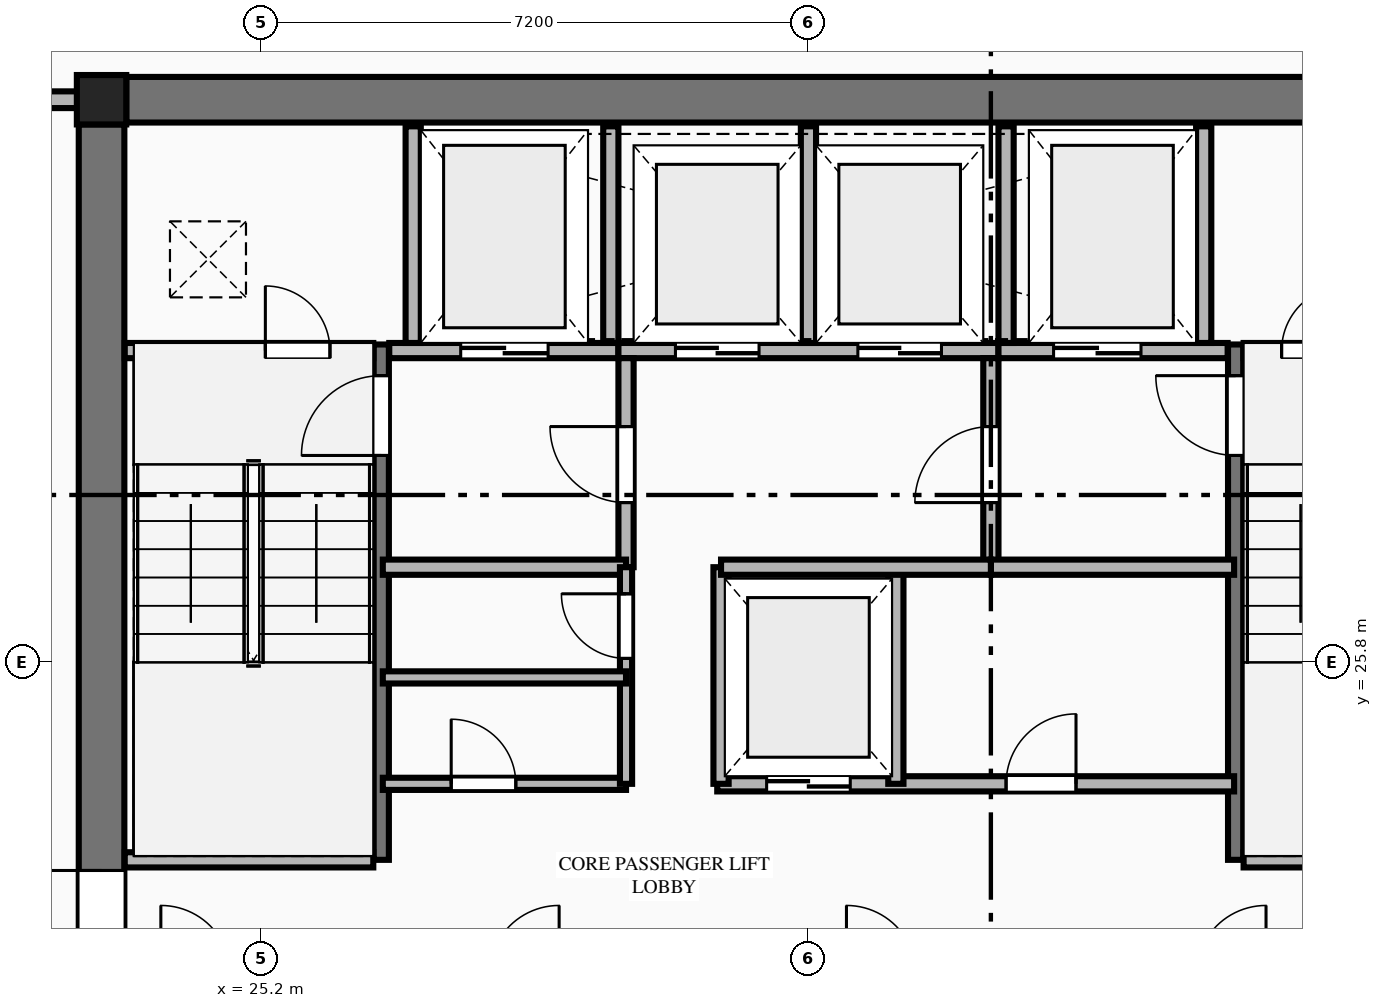
"""IFC4 building model, lengths in metres.
Left out: names, types, materials, properties, quantities, classifications, styles, units other than length and angle.
Written with IfcOpenShell. Run it as: python <this file> out.ifc"""

import sys

from ifc_helpers import new_model, si_unit, direction, frame, frame_2d, origin, origin_2d, place, context, subcontext, project, spatial, rectangle, extrude, element, fill, save


model = new_model("IFC4")
c1 = context("Model", 3, precision=1e-05, world=origin(), true_north=direction((0.0, 1.0)))
c2 = subcontext(c1, "Body", "Model", "MODEL_VIEW")
j1 = project(units=[si_unit("LENGTHUNIT", "METRE"), si_unit("PLANEANGLEUNIT", "RADIAN")], contexts=[c1])
p1 = place(None, origin())
s1 = spatial("IfcSite", under=j1, at=p1, CompositionType="ELEMENT")
p2 = place(p1, origin())
s2 = spatial("IfcBuilding", under=s1, at=p2, CompositionType="ELEMENT")
p3 = place(p2, frame((0.0, 0.0, 221.6)))
s3 = spatial("IfcBuildingStorey", under=s2, at=p3, CompositionType="ELEMENT", Elevation=221.6)
p4 = place(p3, frame((23.1, 33.2, 0.0), z_axis=(0.0, 0.0, 1.0), x_axis=(1.0, 0.0, 0.0)))
e1 = element("IfcColumn", 1, at=p4, inside=s3, PredefinedType="COLUMN", context=c2, shape_type="SweptSolid", body=[
    extrude(rectangle(XDim=0.65, YDim=0.65, at=origin_2d()), origin(), (0.0, 0.0, 1.0), 5.4),
])
p5 = place(p3, frame((23.425, 33.2, 0.0), z_axis=(0.0, 0.0, 1.0), x_axis=(1.0, 0.0, 0.0)))
e2 = element("IfcWall", 2, at=p5, inside=s3, PredefinedType="SHEAR", context=c2, shape_type="SweptSolid", body=[
    extrude(rectangle(XDim=17.95, YDim=0.6, at=frame_2d((8.975, 0.0))), origin(), (0.0, 0.0, 1.0), 5.2),
])
p6 = place(p3, frame((23.1, 18.925, 0.0), z_axis=(0.0, 0.0, 1.0), x_axis=(0.0, 1.0, 0.0)))
e3 = element("IfcWall", 3, at=p6, inside=s3, PredefinedType="SHEAR", context=c2, shape_type="SweptSolid", body=[
    extrude(rectangle(XDim=13.95, YDim=0.6, at=frame_2d((6.975, 0.0))), origin(), (0.0, 0.0, 1.0), 5.2),
])
p7 = place(p6, frame((2.915, 0.0, 0.0)))
e4 = element("IfcOpeningElement", 4, at=p7, cuts=e3, PredefinedType="OPENING", context=c2, shape_type="SweptSolid", body=[
    extrude(rectangle(XDim=1.22, YDim=2.25, at=frame_2d((0.61, 1.125))), frame((0.0, 0.31, 0.0), z_axis=(0.0, -1.0, 0.0), x_axis=(1.0, 0.0, 0.0)), (0.0, 0.0, 1.0), 0.62),
])
p8 = place(p3, frame((26.78, 23.2, 0.0), z_axis=(0.0, 0.0, 1.0), x_axis=(0.0, 1.0, 0.0)))
e5 = element("IfcWall", 5, at=p8, inside=s3, PredefinedType="SHEAR", context=c2, shape_type="SweptSolid", body=[
    extrude(rectangle(XDim=6.78, YDim=0.2, at=frame_2d((3.39, 0.0))), origin(), (0.0, 0.0, 1.0), 5.4),
])
p9 = place(p8, frame((5.32, 0.0, 0.0)))
e6 = element("IfcOpeningElement", 6, at=p9, cuts=e5, PredefinedType="OPENING", context=c2, shape_type="SweptSolid", body=[
    extrude(rectangle(XDim=1.05, YDim=2.15, at=frame_2d((0.525, 1.075))), frame((0.0, 0.11, 0.0), z_axis=(0.0, -1.0, 0.0), x_axis=(1.0, 0.0, 0.0)), (0.0, 0.0, 1.0), 0.22),
])
p10 = place(p3, frame((23.405, 23.2, 0.0), z_axis=(0.0, 0.0, 1.0), x_axis=(1.0, 0.0, 0.0)))
e7 = element("IfcWall", 7, at=p10, inside=s3, PredefinedType="PLUMBINGWALL", context=c2, shape_type="SweptSolid", body=[
    extrude(rectangle(XDim=3.27, YDim=0.2, at=frame_2d((1.635, 0.0))), origin(), (0.0, 0.0, 1.0), 5.2),
])
p11 = place(p3, frame((38.02, 23.2, 0.0), z_axis=(0.0, 0.0, 1.0), x_axis=(0.0, 1.0, 0.0)))
e8 = element("IfcWall", 8, at=p11, inside=s3, PredefinedType="SHEAR", context=c2, shape_type="SweptSolid", body=[
    extrude(rectangle(XDim=6.78, YDim=0.2, at=frame_2d((3.39, 0.0))), origin(), (0.0, 0.0, 1.0), 5.4),
])
p12 = place(p11, frame((5.32, 0.0, 0.0)))
e9 = element("IfcOpeningElement", 9, at=p12, cuts=e8, PredefinedType="OPENING", context=c2, shape_type="SweptSolid", body=[
    extrude(rectangle(XDim=1.05, YDim=2.15, at=frame_2d((0.525, 1.075))), frame((0.0, 0.11, 0.0), z_axis=(0.0, -1.0, 0.0), x_axis=(1.0, 0.0, 0.0)), (0.0, 0.0, 1.0), 0.22),
])
p13 = place(p3, frame((38.125, 23.2, 0.0), z_axis=(0.0, 0.0, 1.0), x_axis=(1.0, 0.0, 0.0)))
e10 = element("IfcWall", 10, at=p13, inside=s3, PredefinedType="PLUMBINGWALL", context=c2, shape_type="SweptSolid", body=[
    extrude(rectangle(XDim=3.27, YDim=0.2, at=frame_2d((1.635, 0.0))), origin(), (0.0, 0.0, 1.0), 5.2),
])
p14 = place(p3, frame((23.405, 29.9, 0.0), z_axis=(0.0, 0.0, 1.0), x_axis=(1.0, 0.0, 0.0)))
e11 = element("IfcWall", 11, at=p14, inside=s3, PredefinedType="PLUMBINGWALL", context=c2, shape_type="SweptSolid", body=[
    extrude(rectangle(XDim=3.27, YDim=0.2, at=frame_2d((1.635, 0.0))), origin(), (0.0, 0.0, 1.0), 5.2),
])
p15 = place(p14, frame((1.85, 0.0, 0.0)))
e12 = element("IfcOpeningElement", 12, at=p15, cuts=e11, PredefinedType="OPENING", context=c2, shape_type="SweptSolid", body=[
    extrude(rectangle(XDim=0.85, YDim=2.05, at=frame_2d((0.425, 1.025))), frame((0.0, 0.11, 0.0), z_axis=(0.0, -1.0, 0.0), x_axis=(1.0, 0.0, 0.0)), (0.0, 0.0, 1.0), 0.22),
])
p16 = place(p3, frame((26.885, 29.9, 0.0), z_axis=(0.0, 0.0, 1.0), x_axis=(1.0, 0.0, 0.0)))
e13 = element("IfcWall", 13, at=p16, inside=s3, PredefinedType="PLUMBINGWALL", context=c2, shape_type="SweptSolid", body=[
    extrude(rectangle(XDim=3.015, YDim=0.2, at=frame_2d((1.507, 0.0))), origin(), (0.0, 0.0, 1.0), 5.2),
])
p17 = place(p16, frame((0.94, 0.0, 0.0)))
e14 = element("IfcOpeningElement", 14, at=p17, cuts=e13, PredefinedType="OPENING", context=c2, shape_type="SweptSolid", body=[
    extrude(rectangle(XDim=1.15, YDim=2.2, at=frame_2d((0.575, 1.1))), frame((0.0, 0.11, 0.0), z_axis=(0.0, -1.0, 0.0), x_axis=(1.0, 0.0, 0.0)), (0.0, 0.0, 1.0), 0.22),
])
p18 = place(p3, frame((29.9, 29.9, 0.0), z_axis=(0.0, 0.0, 1.0), x_axis=(1.0, 0.0, 0.0)))
e15 = element("IfcWall", 15, at=p18, inside=s3, PredefinedType="PLUMBINGWALL", context=c2, shape_type="SweptSolid", body=[
    extrude(rectangle(XDim=5.0, YDim=0.2, at=frame_2d((2.5, 0.0))), origin(), (0.0, 0.0, 1.0), 5.2),
])
p19 = place(p18, frame((0.75, 0.0, 0.0)))
e16 = element("IfcOpeningElement", 16, at=p19, cuts=e15, PredefinedType="OPENING", context=c2, shape_type="SweptSolid", body=[
    extrude(rectangle(XDim=1.1, YDim=2.2, at=frame_2d((0.55, 1.1))), frame((0.0, 0.11, 0.0), z_axis=(0.0, -1.0, 0.0), x_axis=(1.0, 0.0, 0.0)), (0.0, 0.0, 1.0), 0.22),
])
p20 = place(p18, frame((3.15, 0.0, 0.0)))
e17 = element("IfcOpeningElement", 17, at=p20, cuts=e15, PredefinedType="OPENING", context=c2, shape_type="SweptSolid", body=[
    extrude(rectangle(XDim=1.1, YDim=2.2, at=frame_2d((0.55, 1.1))), frame((0.0, 0.11, 0.0), z_axis=(0.0, -1.0, 0.0), x_axis=(1.0, 0.0, 0.0)), (0.0, 0.0, 1.0), 0.22),
])
p21 = place(p3, frame((34.9, 29.9, 0.0), z_axis=(0.0, 0.0, 1.0), x_axis=(1.0, 0.0, 0.0)))
e18 = element("IfcWall", 18, at=p21, inside=s3, PredefinedType="PLUMBINGWALL", context=c2, shape_type="SweptSolid", body=[
    extrude(rectangle(XDim=3.015, YDim=0.2, at=frame_2d((1.508, 0.0))), origin(), (0.0, 0.0, 1.0), 5.2),
])
p22 = place(p21, frame((0.725, 0.0, 0.0)))
e19 = element("IfcOpeningElement", 19, at=p22, cuts=e18, PredefinedType="OPENING", context=c2, shape_type="SweptSolid", body=[
    extrude(rectangle(XDim=1.15, YDim=2.2, at=frame_2d((0.575, 1.1))), frame((0.0, 0.11, 0.0), z_axis=(0.0, -1.0, 0.0), x_axis=(1.0, 0.0, 0.0)), (0.0, 0.0, 1.0), 0.22),
])
p23 = place(p3, frame((38.125, 29.9, 0.0), z_axis=(0.0, 0.0, 1.0), x_axis=(1.0, 0.0, 0.0)))
e20 = element("IfcWall", 20, at=p23, inside=s3, PredefinedType="PLUMBINGWALL", context=c2, shape_type="SweptSolid", body=[
    extrude(rectangle(XDim=3.27, YDim=0.2, at=frame_2d((1.635, 0.0))), origin(), (0.0, 0.0, 1.0), 5.2),
])
p24 = place(p23, frame((0.5, 0.0, 0.0)))
e21 = element("IfcOpeningElement", 21, at=p24, cuts=e20, PredefinedType="OPENING", context=c2, shape_type="SweptSolid", body=[
    extrude(rectangle(XDim=0.85, YDim=2.05, at=frame_2d((0.425, 1.025))), frame((0.0, 0.11, 0.0), z_axis=(0.0, -1.0, 0.0), x_axis=(1.0, 0.0, 0.0)), (0.0, 0.0, 1.0), 0.22),
])
for number, where, z_axis, x_axis in (
    (22, (27.2, 30.0, 0.0), (0.0, 0.0, 1.0), (0.0, 1.0, 0.0)),
    (23, (29.8, 30.0, 0.0), (0.0, 0.0, 1.0), (0.0, 1.0, 0.0)),
    (24, (32.4, 30.0, 0.0), (0.0, 0.0, 1.0), (0.0, 1.0, 0.0)),
    (25, (35.0, 30.0, 0.0), (0.0, 0.0, 1.0), (0.0, 1.0, 0.0)),
    (26, (37.6, 30.0, 0.0), (0.0, 0.0, 1.0), (0.0, 1.0, 0.0)),
):
    element("IfcWall", number, at=place(p3, frame(where, z_axis=z_axis, x_axis=x_axis)), inside=s3, PredefinedType="PLUMBINGWALL", context=c2, shape_type="SweptSolid", body=[
        extrude(rectangle(XDim=2.85, YDim=0.2, at=frame_2d((1.425, 0.0))), origin(), (0.0, 0.0, 1.0), 5.2),
    ])
p25 = place(p3, frame((30.0, 27.05, 0.0), z_axis=(0.0, 0.0, 1.0), x_axis=(0.0, 1.0, 0.0)))
e27 = element("IfcWall", 27, at=p25, inside=s3, PredefinedType="PLUMBINGWALL", context=c2, shape_type="SweptSolid", body=[
    extrude(rectangle(XDim=2.75, YDim=0.2, at=frame_2d((1.375, 0.0))), origin(), (0.0, 0.0, 1.0), 5.2),
])
p26 = place(p25, frame((0.85, 0.0, 0.0)))
e28 = element("IfcOpeningElement", 28, at=p26, cuts=e27, PredefinedType="OPENING", context=c2, shape_type="SweptSolid", body=[
    extrude(rectangle(XDim=1.0, YDim=2.15, at=frame_2d((0.5, 1.075))), frame((0.0, 0.11, 0.0), z_axis=(0.0, -1.0, 0.0), x_axis=(1.0, 0.0, 0.0)), (0.0, 0.0, 1.0), 0.22),
])
p27 = place(p3, frame((26.8, 27.05, 0.0), z_axis=(0.0, 0.0, 1.0), x_axis=(1.0, 0.0, 0.0)))
e29 = element("IfcWall", 29, at=p27, inside=s3, PredefinedType="PLUMBINGWALL", context=c2, shape_type="SweptSolid", body=[
    extrude(rectangle(XDim=3.2, YDim=0.2, at=frame_2d((1.6, 0.0))), origin(), (0.0, 0.0, 1.0), 5.2),
])
p28 = place(p3, frame((34.8, 27.05, 0.0), z_axis=(0.0, 0.0, 1.0), x_axis=(0.0, 1.0, 0.0)))
e30 = element("IfcWall", 30, at=p28, inside=s3, PredefinedType="PLUMBINGWALL", context=c2, shape_type="SweptSolid", body=[
    extrude(rectangle(XDim=2.75, YDim=0.2, at=frame_2d((1.375, 0.0))), origin(), (0.0, 0.0, 1.0), 5.2),
])
p29 = place(p28, frame((0.85, 0.0, 0.0)))
e31 = element("IfcOpeningElement", 31, at=p29, cuts=e30, PredefinedType="OPENING", context=c2, shape_type="SweptSolid", body=[
    extrude(rectangle(XDim=1.0, YDim=2.15, at=frame_2d((0.5, 1.075))), frame((0.0, 0.11, 0.0), z_axis=(0.0, -1.0, 0.0), x_axis=(1.0, 0.0, 0.0)), (0.0, 0.0, 1.0), 0.22),
])
p30 = place(p3, frame((34.8, 27.05, 0.0), z_axis=(0.0, 0.0, 1.0), x_axis=(1.0, 0.0, 0.0)))
e32 = element("IfcWall", 32, at=p30, inside=s3, PredefinedType="PLUMBINGWALL", context=c2, shape_type="SweptSolid", body=[
    extrude(rectangle(XDim=3.2, YDim=0.2, at=frame_2d((1.6, 0.0))), origin(), (0.0, 0.0, 1.0), 5.2),
])
p31 = place(p3, frame((26.8, 24.2, 0.0), z_axis=(0.0, 0.0, 1.0), x_axis=(1.0, 0.0, 0.0)))
e33 = element("IfcWall", 33, at=p31, inside=s3, PredefinedType="PARTITIONING", context=c2, shape_type="SweptSolid", body=[
    extrude(rectangle(XDim=3.2, YDim=0.16, at=frame_2d((1.6, 0.0))), origin(), (0.0, 0.0, 1.0), 5.2),
])
p32 = place(p31, frame((0.9, 0.0, 0.0)))
e34 = element("IfcOpeningElement", 34, at=p32, cuts=e33, PredefinedType="OPENING", context=c2, shape_type="SweptSolid", body=[
    extrude(rectangle(XDim=0.85, YDim=2.05, at=frame_2d((0.425, 1.025))), frame((0.0, 0.09, 0.0), z_axis=(0.0, -1.0, 0.0), x_axis=(1.0, 0.0, 0.0)), (0.0, 0.0, 1.0), 0.18),
])
p33 = place(p3, frame((30.0, 24.2, 0.0), z_axis=(0.0, 0.0, 1.0), x_axis=(0.0, 1.0, 0.0)))
e35 = element("IfcWall", 35, at=p33, inside=s3, PredefinedType="PARTITIONING", context=c2, shape_type="SweptSolid", body=[
    extrude(rectangle(XDim=2.85, YDim=0.16, at=frame_2d((1.425, 0.0))), origin(), (0.0, 0.0, 1.0), 5.2),
])
p34 = place(p33, frame((1.65, 0.0, 0.0)))
e36 = element("IfcOpeningElement", 36, at=p34, cuts=e35, PredefinedType="OPENING", context=c2, shape_type="SweptSolid", body=[
    extrude(rectangle(XDim=0.85, YDim=2.05, at=frame_2d((0.425, 1.025))), frame((0.0, 0.09, 0.0), z_axis=(0.0, -1.0, 0.0), x_axis=(1.0, 0.0, 0.0)), (0.0, 0.0, 1.0), 0.18),
])
p35 = place(p3, frame((31.2, 24.2, 0.0), z_axis=(0.0, 0.0, 1.0), x_axis=(1.0, 0.0, 0.0)))
e37 = element("IfcWall", 37, at=p35, inside=s3, PredefinedType="PLUMBINGWALL", context=c2, shape_type="SweptSolid", body=[
    extrude(rectangle(XDim=6.8, YDim=0.2, at=frame_2d((3.4, 0.0))), origin(), (0.0, 0.0, 1.0), 5.2),
])
p36 = place(p35, frame((0.65, 0.0, 0.0)))
e38 = element("IfcOpeningElement", 38, at=p36, cuts=e37, PredefinedType="OPENING", context=c2, shape_type="SweptSolid", body=[
    extrude(rectangle(XDim=1.1, YDim=2.2, at=frame_2d((0.55, 1.1))), frame((0.0, 0.11, 0.0), z_axis=(0.0, -1.0, 0.0), x_axis=(1.0, 0.0, 0.0)), (0.0, 0.0, 1.0), 0.22),
])
p37 = place(p35, frame((3.8, 0.0, 0.0)))
e39 = element("IfcOpeningElement", 39, at=p37, cuts=e37, PredefinedType="OPENING", context=c2, shape_type="SweptSolid", body=[
    extrude(rectangle(XDim=0.92, YDim=2.15, at=frame_2d((0.46, 1.075))), frame((0.0, 0.11, 0.0), z_axis=(0.0, -1.0, 0.0), x_axis=(1.0, 0.0, 0.0)), (0.0, 0.0, 1.0), 0.22),
])
for number, where, z_axis, x_axis in (
    (40, (31.25, 24.2, 0.0), (0.0, 0.0, 1.0), (0.0, 1.0, 0.0)),
    (41, (33.55, 24.2, 0.0), (0.0, 0.0, 1.0), (0.0, 1.0, 0.0)),
):
    element("IfcWall", number, at=place(p3, frame(where, z_axis=z_axis, x_axis=x_axis)), inside=s3, PredefinedType="PLUMBINGWALL", context=c2, shape_type="SweptSolid", body=[
        extrude(rectangle(XDim=2.85, YDim=0.2, at=frame_2d((1.425, 0.0))), origin(), (0.0, 0.0, 1.0), 5.2),
    ])
p38 = place(p3, frame((31.25, 27.05, 0.0), z_axis=(0.0, 0.0, 1.0), x_axis=(1.0, 0.0, 0.0)))
e42 = element("IfcWall", 42, at=p38, inside=s3, PredefinedType="PLUMBINGWALL", context=c2, shape_type="SweptSolid", body=[
    extrude(rectangle(XDim=3.55, YDim=0.2, at=frame_2d((1.775, 0.0))), origin(), (0.0, 0.0, 1.0), 5.2),
])
p39 = place(p3, frame((26.8, 25.6, 0.0), z_axis=(0.0, 0.0, 1.0), x_axis=(1.0, 0.0, 0.0)))
e43 = element("IfcWall", 43, at=p39, inside=s3, PredefinedType="PARTITIONING", context=c2, shape_type="SweptSolid", body=[
    extrude(rectangle(XDim=3.2, YDim=0.16, at=frame_2d((1.6, 0.0))), origin(), (0.0, 0.0, 1.0), 5.2),
])
p40 = place(p3, frame((15.342, 33.2, 0.0), z_axis=(0.0, 0.0, 1.0), x_axis=(1.0, 0.0, 0.0)))
e44 = element("IfcWall", 44, at=p40, inside=s3, PredefinedType="PARTITIONING", context=c2, shape_type="SweptSolid", body=[
    extrude(rectangle(XDim=7.458, YDim=0.22, at=frame_2d((3.729, 0.0))), origin(), (0.0, 0.0, 1.0), 5.2),
])
p41 = place(p40, frame((5.808, 0.0, 0.0)))
e45 = element("IfcOpeningElement", 45, at=p41, cuts=e44, PredefinedType="OPENING", context=c2, shape_type="SweptSolid", body=[
    extrude(rectangle(XDim=1.0, YDim=2.15, at=frame_2d((0.5, 1.075))), frame((0.0, 0.12, 0.0), z_axis=(0.0, -1.0, 0.0), x_axis=(1.0, 0.0, 0.0)), (0.0, 0.0, 1.0), 0.24),
])
p42 = place(p7, origin())
e46 = element("IfcDoor", 46, at=p42, inside=s3, OperationType="SINGLE_SWING_RIGHT", PredefinedType="DOOR", context=c2, shape_type="SweptSolid", body=[
    extrude(rectangle(XDim=1.22, YDim=2.25, at=frame_2d((0.61, 1.125))), frame((0.0, 0.025, 0.0), z_axis=(0.0, -1.0, 0.0), x_axis=(1.0, 0.0, 0.0)), (0.0, 0.0, 1.0), 0.05),
])
fill(e4, e46)
p43 = place(p9, origin())
e47 = element("IfcDoor", 47, at=p43, inside=s3, OperationType="SINGLE_SWING_LEFT", PredefinedType="DOOR", context=c2, shape_type="SweptSolid", body=[
    extrude(rectangle(XDim=1.05, YDim=2.15, at=frame_2d((0.525, 1.075))), frame((0.0, 0.025, 0.0), z_axis=(0.0, -1.0, 0.0), x_axis=(1.0, 0.0, 0.0)), (0.0, 0.0, 1.0), 0.05),
])
fill(e6, e47)
p44 = place(p12, origin())
e48 = element("IfcDoor", 48, at=p44, inside=s3, OperationType="SINGLE_SWING_RIGHT", PredefinedType="DOOR", context=c2, shape_type="SweptSolid", body=[
    extrude(rectangle(XDim=1.05, YDim=2.15, at=frame_2d((0.525, 1.075))), frame((0.0, 0.025, 0.0), z_axis=(0.0, -1.0, 0.0), x_axis=(1.0, 0.0, 0.0)), (0.0, 0.0, 1.0), 0.05),
])
fill(e9, e48)
p45 = place(p15, origin())
e49 = element("IfcDoor", 49, at=p45, inside=s3, OperationType="SINGLE_SWING_LEFT", PredefinedType="DOOR", context=c2, shape_type="SweptSolid", body=[
    extrude(rectangle(XDim=0.85, YDim=2.05, at=frame_2d((0.425, 1.025))), frame((0.0, 0.025, 0.0), z_axis=(0.0, -1.0, 0.0), x_axis=(1.0, 0.0, 0.0)), (0.0, 0.0, 1.0), 0.05),
])
fill(e12, e49)
p46 = place(p24, origin())
e50 = element("IfcDoor", 50, at=p46, inside=s3, OperationType="SINGLE_SWING_RIGHT", PredefinedType="DOOR", context=c2, shape_type="SweptSolid", body=[
    extrude(rectangle(XDim=0.85, YDim=2.05, at=frame_2d((0.425, 1.025))), frame((0.0, 0.025, 0.0), z_axis=(0.0, -1.0, 0.0), x_axis=(1.0, 0.0, 0.0)), (0.0, 0.0, 1.0), 0.05),
])
fill(e21, e50)
p47 = place(p17, origin())
e51 = element("IfcDoor", 51, at=p47, inside=s3, OperationType="DOUBLE_DOOR_SLIDING", PredefinedType="DOOR", context=c2, shape_type="SweptSolid", body=[
    extrude(rectangle(XDim=1.15, YDim=2.2, at=frame_2d((0.575, 1.1))), frame((0.0, 0.025, 0.0), z_axis=(0.0, -1.0, 0.0), x_axis=(1.0, 0.0, 0.0)), (0.0, 0.0, 1.0), 0.05),
])
fill(e14, e51)
p48 = place(p22, origin())
e52 = element("IfcDoor", 52, at=p48, inside=s3, OperationType="DOUBLE_DOOR_SLIDING", PredefinedType="DOOR", context=c2, shape_type="SweptSolid", body=[
    extrude(rectangle(XDim=1.15, YDim=2.2, at=frame_2d((0.575, 1.1))), frame((0.0, 0.025, 0.0), z_axis=(0.0, -1.0, 0.0), x_axis=(1.0, 0.0, 0.0)), (0.0, 0.0, 1.0), 0.05),
])
fill(e19, e52)
p49 = place(p19, origin())
e53 = element("IfcDoor", 53, at=p49, inside=s3, OperationType="DOUBLE_DOOR_SLIDING", PredefinedType="DOOR", context=c2, shape_type="SweptSolid", body=[
    extrude(rectangle(XDim=1.1, YDim=2.2, at=frame_2d((0.55, 1.1))), frame((0.0, 0.025, 0.0), z_axis=(0.0, -1.0, 0.0), x_axis=(1.0, 0.0, 0.0)), (0.0, 0.0, 1.0), 0.05),
])
fill(e16, e53)
p50 = place(p20, origin())
e54 = element("IfcDoor", 54, at=p50, inside=s3, OperationType="DOUBLE_DOOR_SLIDING", PredefinedType="DOOR", context=c2, shape_type="SweptSolid", body=[
    extrude(rectangle(XDim=1.1, YDim=2.2, at=frame_2d((0.55, 1.1))), frame((0.0, 0.025, 0.0), z_axis=(0.0, -1.0, 0.0), x_axis=(1.0, 0.0, 0.0)), (0.0, 0.0, 1.0), 0.05),
])
fill(e17, e54)
p51 = place(p26, origin())
e55 = element("IfcDoor", 55, at=p51, inside=s3, OperationType="SINGLE_SWING_RIGHT", PredefinedType="DOOR", context=c2, shape_type="SweptSolid", body=[
    extrude(rectangle(XDim=1.0, YDim=2.15, at=frame_2d((0.5, 1.075))), frame((0.0, 0.025, 0.0), z_axis=(0.0, -1.0, 0.0), x_axis=(1.0, 0.0, 0.0)), (0.0, 0.0, 1.0), 0.05),
])
fill(e28, e55)
p52 = place(p29, origin())
e56 = element("IfcDoor", 56, at=p52, inside=s3, OperationType="SINGLE_SWING_LEFT", PredefinedType="DOOR", context=c2, shape_type="SweptSolid", body=[
    extrude(rectangle(XDim=1.0, YDim=2.15, at=frame_2d((0.5, 1.075))), frame((0.0, 0.025, 0.0), z_axis=(0.0, -1.0, 0.0), x_axis=(1.0, 0.0, 0.0)), (0.0, 0.0, 1.0), 0.05),
])
fill(e31, e56)
p53 = place(p36, origin())
e57 = element("IfcDoor", 57, at=p53, inside=s3, OperationType="DOUBLE_DOOR_SLIDING", PredefinedType="DOOR", context=c2, shape_type="SweptSolid", body=[
    extrude(rectangle(XDim=1.1, YDim=2.2, at=frame_2d((0.55, 1.1))), frame((0.0, 0.025, 0.0), z_axis=(0.0, -1.0, 0.0), x_axis=(1.0, 0.0, 0.0)), (0.0, 0.0, 1.0), 0.05),
])
fill(e38, e57)
p54 = place(p32, origin())
e58 = element("IfcDoor", 58, at=p54, inside=s3, OperationType="SINGLE_SWING_LEFT", PredefinedType="DOOR", context=c2, shape_type="SweptSolid", body=[
    extrude(rectangle(XDim=0.85, YDim=2.05, at=frame_2d((0.425, 1.025))), frame((0.0, 0.025, 0.0), z_axis=(0.0, -1.0, 0.0), x_axis=(1.0, 0.0, 0.0)), (0.0, 0.0, 1.0), 0.05),
])
fill(e34, e58)
p55 = place(p34, origin())
e59 = element("IfcDoor", 59, at=p55, inside=s3, OperationType="SINGLE_SWING_RIGHT", PredefinedType="DOOR", context=c2, shape_type="SweptSolid", body=[
    extrude(rectangle(XDim=0.85, YDim=2.05, at=frame_2d((0.425, 1.025))), frame((0.0, 0.025, 0.0), z_axis=(0.0, -1.0, 0.0), x_axis=(1.0, 0.0, 0.0)), (0.0, 0.0, 1.0), 0.05),
])
fill(e36, e59)
p56 = place(p37, origin())
e60 = element("IfcDoor", 60, at=p56, inside=s3, OperationType="SINGLE_SWING_RIGHT", PredefinedType="DOOR", context=c2, shape_type="SweptSolid", body=[
    extrude(rectangle(XDim=0.92, YDim=2.15, at=frame_2d((0.46, 1.075))), frame((0.0, 0.025, 0.0), z_axis=(0.0, -1.0, 0.0), x_axis=(1.0, 0.0, 0.0)), (0.0, 0.0, 1.0), 0.05),
])
fill(e39, e60)
save(model, sys.argv[1])
